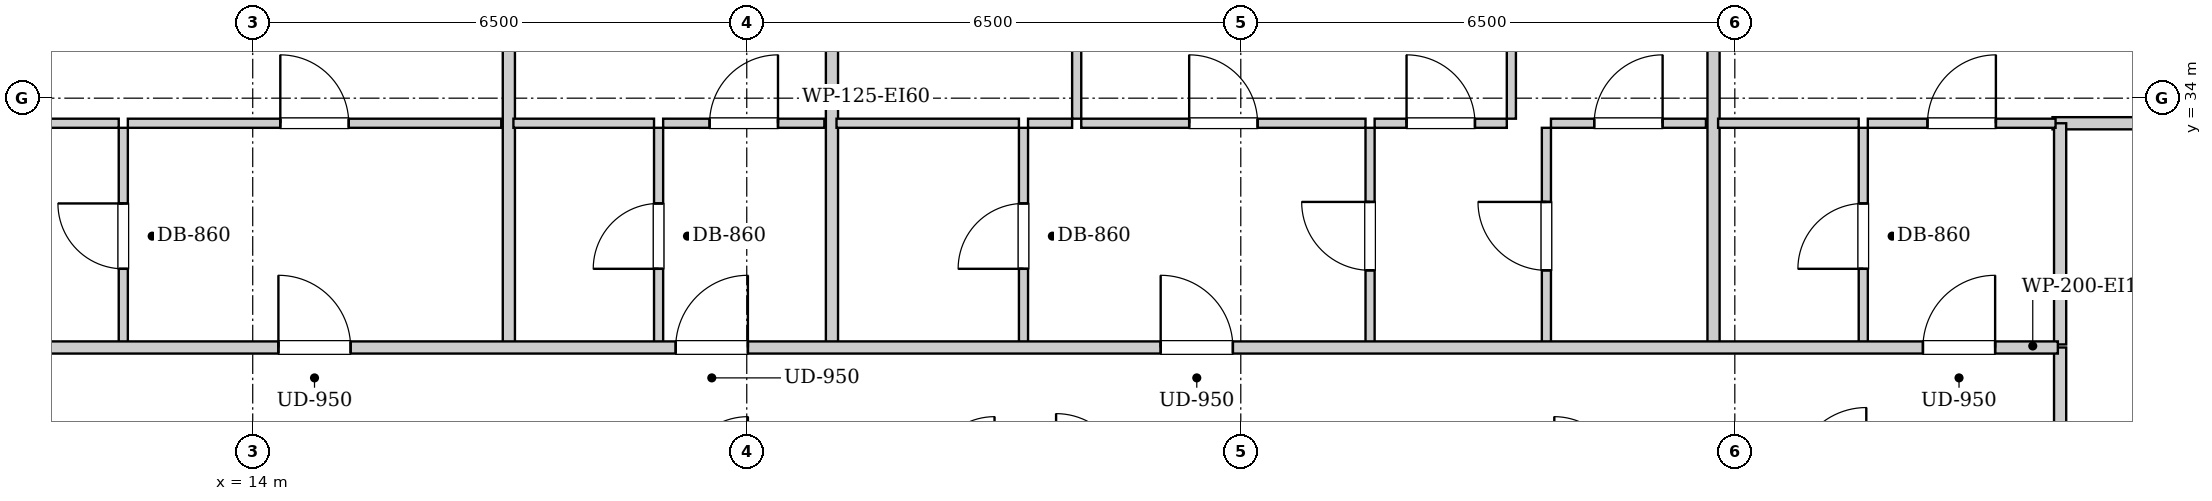
"""IFC4 building model, lengths in metres.
Left out: names, types, materials, properties, quantities, classifications, styles, units other than length and angle.
Written with IfcOpenShell. Run it as: python <this file> out.ifc"""

import sys

from ifc_helpers import new_model, si_unit, direction, frame, frame_2d, origin, place, context, subcontext, project, spatial, rectangle, extrude, element, fill, save


model = new_model("IFC4")
c1 = context("Model", 3, precision=1e-05, world=origin(), true_north=direction((0.0, 1.0)))
c2 = subcontext(c1, "Body", "Model", "MODEL_VIEW")
j1 = project(units=[si_unit("LENGTHUNIT", "METRE"), si_unit("PLANEANGLEUNIT", "RADIAN")], contexts=[c1])
p1 = place(None, origin())
s1 = spatial("IfcSite", under=j1, at=p1, CompositionType="ELEMENT")
p2 = place(p1, origin())
s2 = spatial("IfcBuilding", under=s1, at=p2, CompositionType="ELEMENT")
p3 = place(p2, frame((0.0, 0.0, 166.65)))
s3 = spatial("IfcBuildingStorey", under=s2, at=p3, CompositionType="ELEMENT", Elevation=166.65)
p4 = place(p3, frame((37.78, 28.98, 0.0), z_axis=(0.0, 0.0, 1.0), x_axis=(0.0, 1.0, 0.0)))
e1 = element("IfcWall", 1, at=p4, inside=s3, PredefinedType="PARTITIONING", context=c2, shape_type="SweptSolid", body=[
    extrude(rectangle(XDim=1.74, YDim=0.16, at=frame_2d((0.87, 0.0))), origin(), (0.0, 0.0, 1.0), 2.93),
])
p5 = place(p3, frame((12.297, 30.76, 0.0), z_axis=(0.0, 0.0, 1.0), x_axis=(0.0, 1.0, 0.0)))
e2 = element("IfcWall", 2, at=p5, inside=s3, PredefinedType="PARTITIONING", context=c2, shape_type="SweptSolid", body=[
    extrude(rectangle(XDim=2.85, YDim=0.12, at=frame_2d((1.425, 0.0))), origin(), (0.0, 0.0, 1.0), 2.93),
])
p6 = place(p5, frame((0.995, 0.0, 0.0)))
e3 = element("IfcOpeningElement", 3, at=p6, cuts=e2, PredefinedType="OPENING", context=c2, shape_type="SweptSolid", body=[
    extrude(rectangle(XDim=0.86, YDim=2.05, at=frame_2d((0.43, 1.025))), frame((0.0, 0.07, 0.0), z_axis=(0.0, -1.0, 0.0), x_axis=(1.0, 0.0, 0.0)), (0.0, 0.0, 1.0), 0.14),
])
p7 = place(p3, frame((11.11, 33.67, 0.0), z_axis=(0.0, 0.0, 1.0), x_axis=(1.0, 0.0, 0.0)))
e4 = element("IfcWall", 4, at=p7, inside=s3, PredefinedType="PARTITIONING", context=c2, shape_type="SweptSolid", body=[
    extrude(rectangle(XDim=1.127, YDim=0.12, at=frame_2d((0.563, 0.0))), origin(), (0.0, 0.0, 1.0), 2.93),
])
p8 = place(p3, frame((12.357, 33.67, 0.0), z_axis=(0.0, 0.0, 1.0), x_axis=(1.0, 0.0, 0.0)))
e5 = element("IfcWall", 5, at=p8, inside=s3, PredefinedType="PARTITIONING", context=c2, shape_type="SweptSolid", body=[
    extrude(rectangle(XDim=4.913, YDim=0.12, at=frame_2d((2.457, 0.0))), origin(), (0.0, 0.0, 1.0), 2.93),
])
p9 = place(p8, frame((2.006, 0.0, 0.0)))
e6 = element("IfcOpeningElement", 6, at=p9, cuts=e5, PredefinedType="OPENING", context=c2, shape_type="SweptSolid", body=[
    extrude(rectangle(XDim=0.9, YDim=2.05, at=frame_2d((0.45, 1.025))), frame((0.0, 0.07, 0.0), z_axis=(0.0, -1.0, 0.0), x_axis=(1.0, 0.0, 0.0)), (0.0, 0.0, 1.0), 0.14),
])
p10 = place(p3, frame((17.37, 30.76, 0.0), z_axis=(0.0, 0.0, 1.0), x_axis=(0.0, 1.0, 0.0)))
e7 = element("IfcWall", 7, at=p10, inside=s3, PredefinedType="PARTITIONING", context=c2, shape_type="SweptSolid", body=[
    extrude(rectangle(XDim=12.26, YDim=0.16, at=frame_2d((6.13, 0.0))), origin(), (0.0, 0.0, 1.0), 2.93),
])
p11 = place(p3, frame((19.34, 30.76, 0.0), z_axis=(0.0, 0.0, 1.0), x_axis=(0.0, 1.0, 0.0)))
e8 = element("IfcWall", 8, at=p11, inside=s3, PredefinedType="PARTITIONING", context=c2, shape_type="SweptSolid", body=[
    extrude(rectangle(XDim=2.85, YDim=0.12, at=frame_2d((1.425, 0.0))), origin(), (0.0, 0.0, 1.0), 2.93),
])
p12 = place(p11, frame((0.995, 0.0, 0.0)))
e9 = element("IfcOpeningElement", 9, at=p12, cuts=e8, PredefinedType="OPENING", context=c2, shape_type="SweptSolid", body=[
    extrude(rectangle(XDim=0.86, YDim=2.05, at=frame_2d((0.43, 1.025))), frame((0.0, 0.07, 0.0), z_axis=(0.0, -1.0, 0.0), x_axis=(1.0, 0.0, 0.0)), (0.0, 0.0, 1.0), 0.14),
])
p13 = place(p3, frame((17.43, 33.67, 0.0), z_axis=(0.0, 0.0, 1.0), x_axis=(1.0, 0.0, 0.0)))
e10 = element("IfcWall", 10, at=p13, inside=s3, PredefinedType="PARTITIONING", context=c2, shape_type="SweptSolid", body=[
    extrude(rectangle(XDim=1.85, YDim=0.12, at=frame_2d((0.925, 0.0))), origin(), (0.0, 0.0, 1.0), 2.93),
])
p14 = place(p3, frame((19.4, 33.67, 0.0), z_axis=(0.0, 0.0, 1.0), x_axis=(1.0, 0.0, 0.0)))
e11 = element("IfcWall", 11, at=p14, inside=s3, PredefinedType="PARTITIONING", context=c2, shape_type="SweptSolid", body=[
    extrude(rectangle(XDim=2.121, YDim=0.12, at=frame_2d((1.061, 0.0))), origin(), (0.0, 0.0, 1.0), 2.93),
])
p15 = place(p14, frame((0.611, 0.0, 0.0)))
e12 = element("IfcOpeningElement", 12, at=p15, cuts=e11, PredefinedType="OPENING", context=c2, shape_type="SweptSolid", body=[
    extrude(rectangle(XDim=0.9, YDim=2.05, at=frame_2d((0.45, 1.025))), frame((0.0, 0.07, 0.0), z_axis=(0.0, -1.0, 0.0), x_axis=(1.0, 0.0, 0.0)), (0.0, 0.0, 1.0), 0.14),
])
p16 = place(p3, frame((21.621, 30.76, 0.0), z_axis=(0.0, 0.0, 1.0), x_axis=(0.0, 1.0, 0.0)))
e13 = element("IfcWall", 13, at=p16, inside=s3, PredefinedType="PARTITIONING", context=c2, shape_type="SweptSolid", body=[
    extrude(rectangle(XDim=12.26, YDim=0.16, at=frame_2d((6.13, 0.0))), origin(), (0.0, 0.0, 1.0), 2.93),
])
p17 = place(p3, frame((24.141, 30.76, 0.0), z_axis=(0.0, 0.0, 1.0), x_axis=(0.0, 1.0, 0.0)))
e14 = element("IfcWall", 14, at=p17, inside=s3, PredefinedType="PARTITIONING", context=c2, shape_type="SweptSolid", body=[
    extrude(rectangle(XDim=2.85, YDim=0.12, at=frame_2d((1.425, 0.0))), origin(), (0.0, 0.0, 1.0), 2.93),
])
p18 = place(p17, frame((0.995, 0.0, 0.0)))
e15 = element("IfcOpeningElement", 15, at=p18, cuts=e14, PredefinedType="OPENING", context=c2, shape_type="SweptSolid", body=[
    extrude(rectangle(XDim=0.86, YDim=2.05, at=frame_2d((0.43, 1.025))), frame((0.0, 0.07, 0.0), z_axis=(0.0, -1.0, 0.0), x_axis=(1.0, 0.0, 0.0)), (0.0, 0.0, 1.0), 0.14),
])
p19 = place(p3, frame((21.681, 33.67, 0.0), z_axis=(0.0, 0.0, 1.0), x_axis=(1.0, 0.0, 0.0)))
e16 = element("IfcWall", 16, at=p19, inside=s3, PredefinedType="PARTITIONING", context=c2, shape_type="SweptSolid", body=[
    extrude(rectangle(XDim=2.4, YDim=0.12, at=frame_2d((1.2, 0.0))), origin(), (0.0, 0.0, 1.0), 2.93),
])
p20 = place(p3, frame((28.701, 30.76, 0.0), z_axis=(0.0, 0.0, 1.0), x_axis=(0.0, 1.0, 0.0)))
e17 = element("IfcWall", 17, at=p20, inside=s3, PredefinedType="PARTITIONING", context=c2, shape_type="SweptSolid", body=[
    extrude(rectangle(XDim=2.85, YDim=0.12, at=frame_2d((1.425, 0.0))), origin(), (0.0, 0.0, 1.0), 2.93),
])
p21 = place(p20, frame((0.975, 0.0, 0.0)))
e18 = element("IfcOpeningElement", 18, at=p21, cuts=e17, PredefinedType="OPENING", context=c2, shape_type="SweptSolid", body=[
    extrude(rectangle(XDim=0.9, YDim=2.05, at=frame_2d((0.45, 1.025))), frame((0.0, 0.07, 0.0), z_axis=(0.0, -1.0, 0.0), x_axis=(1.0, 0.0, 0.0)), (0.0, 0.0, 1.0), 0.14),
])
p22 = place(p3, frame((24.201, 33.67, 0.0), z_axis=(0.0, 0.0, 1.0), x_axis=(1.0, 0.0, 0.0)))
e19 = element("IfcWall", 19, at=p22, inside=s3, PredefinedType="PARTITIONING", context=c2, shape_type="SweptSolid", body=[
    extrude(rectangle(XDim=0.58, YDim=0.12, at=frame_2d((0.29, 0.0))), origin(), (0.0, 0.0, 1.0), 2.93),
])
p23 = place(p3, frame((24.901, 33.67, 0.0), z_axis=(0.0, 0.0, 1.0), x_axis=(1.0, 0.0, 0.0)))
e20 = element("IfcWall", 20, at=p23, inside=s3, PredefinedType="PARTITIONING", context=c2, shape_type="SweptSolid", body=[
    extrude(rectangle(XDim=3.74, YDim=0.12, at=frame_2d((1.87, 0.0))), origin(), (0.0, 0.0, 1.0), 2.93),
])
p24 = place(p23, frame((1.42, 0.0, 0.0)))
e21 = element("IfcOpeningElement", 21, at=p24, cuts=e20, PredefinedType="OPENING", context=c2, shape_type="SweptSolid", body=[
    extrude(rectangle(XDim=0.9, YDim=2.05, at=frame_2d((0.45, 1.025))), frame((0.0, 0.07, 0.0), z_axis=(0.0, -1.0, 0.0), x_axis=(1.0, 0.0, 0.0)), (0.0, 0.0, 1.0), 0.14),
])
p25 = place(p3, frame((31.021, 30.76, 0.0), z_axis=(0.0, 0.0, 1.0), x_axis=(0.0, 1.0, 0.0)))
e22 = element("IfcWall", 22, at=p25, inside=s3, PredefinedType="PARTITIONING", context=c2, shape_type="SweptSolid", body=[
    extrude(rectangle(XDim=2.85, YDim=0.12, at=frame_2d((1.425, 0.0))), origin(), (0.0, 0.0, 1.0), 2.93),
])
p26 = place(p25, frame((0.975, 0.0, 0.0)))
e23 = element("IfcOpeningElement", 23, at=p26, cuts=e22, PredefinedType="OPENING", context=c2, shape_type="SweptSolid", body=[
    extrude(rectangle(XDim=0.9, YDim=2.05, at=frame_2d((0.45, 1.025))), frame((0.0, 0.07, 0.0), z_axis=(0.0, -1.0, 0.0), x_axis=(1.0, 0.0, 0.0)), (0.0, 0.0, 1.0), 0.14),
])
p27 = place(p3, frame((28.761, 33.67, 0.0), z_axis=(0.0, 0.0, 1.0), x_axis=(1.0, 0.0, 0.0)))
e24 = element("IfcWall", 24, at=p27, inside=s3, PredefinedType="PARTITIONING", context=c2, shape_type="SweptSolid", body=[
    extrude(rectangle(XDim=1.739, YDim=0.12, at=frame_2d((0.87, 0.0))), origin(), (0.0, 0.0, 1.0), 2.93),
])
p28 = place(p27, frame((0.42, 0.0, 0.0)))
e25 = element("IfcOpeningElement", 25, at=p28, cuts=e24, PredefinedType="OPENING", context=c2, shape_type="SweptSolid", body=[
    extrude(rectangle(XDim=0.9, YDim=2.05, at=frame_2d((0.45, 1.025))), frame((0.0, 0.07, 0.0), z_axis=(0.0, -1.0, 0.0), x_axis=(1.0, 0.0, 0.0)), (0.0, 0.0, 1.0), 0.14),
])
p29 = place(p3, frame((31.081, 33.67, 0.0), z_axis=(0.0, 0.0, 1.0), x_axis=(1.0, 0.0, 0.0)))
e26 = element("IfcWall", 26, at=p29, inside=s3, PredefinedType="PARTITIONING", context=c2, shape_type="SweptSolid", body=[
    extrude(rectangle(XDim=2.039, YDim=0.12, at=frame_2d((1.02, 0.0))), origin(), (0.0, 0.0, 1.0), 2.93),
])
p30 = place(p29, frame((0.569, 0.0, 0.0)))
e27 = element("IfcOpeningElement", 27, at=p30, cuts=e26, PredefinedType="OPENING", context=c2, shape_type="SweptSolid", body=[
    extrude(rectangle(XDim=0.9, YDim=2.05, at=frame_2d((0.45, 1.025))), frame((0.0, 0.07, 0.0), z_axis=(0.0, -1.0, 0.0), x_axis=(1.0, 0.0, 0.0)), (0.0, 0.0, 1.0), 0.14),
])
p31 = place(p3, frame((24.841, 33.73, 0.0), z_axis=(0.0, 0.0, 1.0), x_axis=(0.0, 1.0, 0.0)))
e28 = element("IfcWall", 28, at=p31, inside=s3, PredefinedType="PARTITIONING", context=c2, shape_type="SweptSolid", body=[
    extrude(rectangle(XDim=9.29, YDim=0.12, at=frame_2d((4.645, 0.0))), origin(), (0.0, 0.0, 1.0), 2.93),
])
p32 = place(p31, frame((4.18, 0.0, 0.0)))
e29 = element("IfcOpeningElement", 29, at=p32, cuts=e28, PredefinedType="OPENING", context=c2, shape_type="SweptSolid", body=[
    extrude(rectangle(XDim=0.9, YDim=2.05, at=frame_2d((0.45, 1.025))), frame((0.0, 0.07, 0.0), z_axis=(0.0, -1.0, 0.0), x_axis=(1.0, 0.0, 0.0)), (0.0, 0.0, 1.0), 0.14),
])
p33 = place(p3, frame((30.56, 33.73, 0.0), z_axis=(0.0, 0.0, 1.0), x_axis=(0.0, 1.0, 0.0)))
e30 = element("IfcWall", 30, at=p33, inside=s3, PredefinedType="PARTITIONING", context=c2, shape_type="SweptSolid", body=[
    extrude(rectangle(XDim=7.14, YDim=0.12, at=frame_2d((3.57, 0.0))), origin(), (0.0, 0.0, 1.0), 2.93),
])
p34 = place(p33, frame((3.12, 0.0, 0.0)))
e31 = element("IfcOpeningElement", 31, at=p34, cuts=e30, PredefinedType="OPENING", context=c2, shape_type="SweptSolid", body=[
    extrude(rectangle(XDim=0.9, YDim=2.05, at=frame_2d((0.45, 1.025))), frame((0.0, 0.07, 0.0), z_axis=(0.0, -1.0, 0.0), x_axis=(1.0, 0.0, 0.0)), (0.0, 0.0, 1.0), 0.14),
])
p35 = place(p3, frame((37.68, 33.67, 0.0), z_axis=(0.0, 0.0, 1.0), x_axis=(1.0, 0.0, 0.0)))
e32 = element("IfcWall", 32, at=p35, inside=s3, PredefinedType="PARTITIONING", context=c2, shape_type="SweptSolid", body=[
    extrude(rectangle(XDim=2.34, YDim=0.16, at=frame_2d((1.17, 0.0))), origin(), (0.0, 0.0, 1.0), 2.93),
])
p36 = place(p3, frame((37.78, 30.76, 0.0), z_axis=(0.0, 0.0, 1.0), x_axis=(0.0, 1.0, 0.0)))
e33 = element("IfcWall", 33, at=p36, inside=s3, PredefinedType="PARTITIONING", context=c2, shape_type="SweptSolid", body=[
    extrude(rectangle(XDim=2.91, YDim=0.16, at=frame_2d((1.455, 0.0))), origin(), (0.0, 0.0, 1.0), 2.93),
])
p37 = place(p3, frame((33.22, 30.76, 0.0), z_axis=(0.0, 0.0, 1.0), x_axis=(0.0, 1.0, 0.0)))
e34 = element("IfcWall", 34, at=p37, inside=s3, PredefinedType="PARTITIONING", context=c2, shape_type="SweptSolid", body=[
    extrude(rectangle(XDim=10.28, YDim=0.16, at=frame_2d((5.14, 0.0))), origin(), (0.0, 0.0, 1.0), 2.382),
])
p38 = place(p3, frame((35.19, 30.76, 0.0), z_axis=(0.0, 0.0, 1.0), x_axis=(0.0, 1.0, 0.0)))
e35 = element("IfcWall", 35, at=p38, inside=s3, PredefinedType="PARTITIONING", context=c2, shape_type="SweptSolid", body=[
    extrude(rectangle(XDim=2.85, YDim=0.12, at=frame_2d((1.425, 0.0))), origin(), (0.0, 0.0, 1.0), 2.93),
])
p39 = place(p38, frame((0.995, 0.0, 0.0)))
e36 = element("IfcOpeningElement", 36, at=p39, cuts=e35, PredefinedType="OPENING", context=c2, shape_type="SweptSolid", body=[
    extrude(rectangle(XDim=0.86, YDim=2.05, at=frame_2d((0.43, 1.025))), frame((0.0, 0.07, 0.0), z_axis=(0.0, -1.0, 0.0), x_axis=(1.0, 0.0, 0.0)), (0.0, 0.0, 1.0), 0.14),
])
p40 = place(p3, frame((33.28, 33.67, 0.0), z_axis=(0.0, 0.0, 1.0), x_axis=(1.0, 0.0, 0.0)))
e37 = element("IfcWall", 37, at=p40, inside=s3, PredefinedType="PARTITIONING", context=c2, shape_type="SweptSolid", body=[
    extrude(rectangle(XDim=1.85, YDim=0.12, at=frame_2d((0.925, 0.0))), origin(), (0.0, 0.0, 1.0), 2.93),
])
p41 = place(p3, frame((35.25, 33.67, 0.0), z_axis=(0.0, 0.0, 1.0), x_axis=(1.0, 0.0, 0.0)))
e38 = element("IfcWall", 38, at=p41, inside=s3, PredefinedType="PARTITIONING", context=c2, shape_type="SweptSolid", body=[
    extrude(rectangle(XDim=2.47, YDim=0.12, at=frame_2d((1.235, 0.0))), origin(), (0.0, 0.0, 1.0), 2.93),
])
p42 = place(p41, frame((0.785, 0.0, 0.0)))
e39 = element("IfcOpeningElement", 39, at=p42, cuts=e38, PredefinedType="OPENING", context=c2, shape_type="SweptSolid", body=[
    extrude(rectangle(XDim=0.9, YDim=2.05, at=frame_2d((0.45, 1.025))), frame((0.0, 0.07, 0.0), z_axis=(0.0, -1.0, 0.0), x_axis=(1.0, 0.0, 0.0)), (0.0, 0.0, 1.0), 0.14),
])
p43 = place(p3, frame((10.05, 30.72, 0.0), z_axis=(0.0, 0.0, 1.0), x_axis=(1.0, 0.0, 0.0)))
e40 = element("IfcWall", 40, at=p43, inside=s3, PredefinedType="PARTITIONING", context=c2, shape_type="SweptSolid", body=[
    extrude(rectangle(XDim=27.7, YDim=0.16, at=frame_2d((13.85, 0.0))), origin(), (0.0, 0.0, 1.0), 2.93),
])
p44 = place(p43, frame((4.288, 0.0, 0.0)))
e41 = element("IfcOpeningElement", 41, at=p44, cuts=e40, PredefinedType="OPENING", context=c2, shape_type="SweptSolid", body=[
    extrude(rectangle(XDim=0.95, YDim=2.1, at=frame_2d((0.475, 1.05))), frame((0.0, 0.09, 0.0), z_axis=(0.0, -1.0, 0.0), x_axis=(1.0, 0.0, 0.0)), (0.0, 0.0, 1.0), 0.18),
])
p45 = place(p43, frame((9.515, 0.0, 0.0)))
e42 = element("IfcOpeningElement", 42, at=p45, cuts=e40, PredefinedType="OPENING", context=c2, shape_type="SweptSolid", body=[
    extrude(rectangle(XDim=0.95, YDim=2.1, at=frame_2d((0.475, 1.05))), frame((0.0, 0.09, 0.0), z_axis=(0.0, -1.0, 0.0), x_axis=(1.0, 0.0, 0.0)), (0.0, 0.0, 1.0), 0.18),
])
p46 = place(p43, frame((15.896, 0.0, 0.0)))
e43 = element("IfcOpeningElement", 43, at=p46, cuts=e40, PredefinedType="OPENING", context=c2, shape_type="SweptSolid", body=[
    extrude(rectangle(XDim=0.95, YDim=2.1, at=frame_2d((0.475, 1.05))), frame((0.0, 0.09, 0.0), z_axis=(0.0, -1.0, 0.0), x_axis=(1.0, 0.0, 0.0)), (0.0, 0.0, 1.0), 0.18),
])
p47 = place(p43, frame((25.925, 0.0, 0.0)))
e44 = element("IfcOpeningElement", 44, at=p47, cuts=e40, PredefinedType="OPENING", context=c2, shape_type="SweptSolid", body=[
    extrude(rectangle(XDim=0.95, YDim=2.1, at=frame_2d((0.475, 1.05))), frame((0.0, 0.09, 0.0), z_axis=(0.0, -1.0, 0.0), x_axis=(1.0, 0.0, 0.0)), (0.0, 0.0, 1.0), 0.18),
])
p48 = place(p6, origin())
e45 = element("IfcDoor", 45, at=p48, inside=s3, OperationType="SINGLE_SWING_RIGHT", PredefinedType="DOOR", context=c2, shape_type="SweptSolid", body=[
    extrude(rectangle(XDim=0.86, YDim=2.05, at=frame_2d((0.43, 1.025))), frame((0.0, 0.025, 0.0), z_axis=(0.0, -1.0, 0.0), x_axis=(1.0, 0.0, 0.0)), (0.0, 0.0, 1.0), 0.05),
])
fill(e3, e45)
p49 = place(p9, origin())
e46 = element("IfcDoor", 46, at=p49, inside=s3, OperationType="SINGLE_SWING_LEFT", PredefinedType="DOOR", context=c2, shape_type="SweptSolid", body=[
    extrude(rectangle(XDim=0.9, YDim=2.05, at=frame_2d((0.45, 1.025))), frame((0.0, 0.025, 0.0), z_axis=(0.0, -1.0, 0.0), x_axis=(1.0, 0.0, 0.0)), (0.0, 0.0, 1.0), 0.05),
])
fill(e6, e46)
p50 = place(p12, origin())
e47 = element("IfcDoor", 47, at=p50, inside=s3, OperationType="SINGLE_SWING_LEFT", PredefinedType="DOOR", context=c2, shape_type="SweptSolid", body=[
    extrude(rectangle(XDim=0.86, YDim=2.05, at=frame_2d((0.43, 1.025))), frame((0.0, 0.025, 0.0), z_axis=(0.0, -1.0, 0.0), x_axis=(1.0, 0.0, 0.0)), (0.0, 0.0, 1.0), 0.05),
])
fill(e9, e47)
p51 = place(p15, origin())
e48 = element("IfcDoor", 48, at=p51, inside=s3, OperationType="SINGLE_SWING_RIGHT", PredefinedType="DOOR", context=c2, shape_type="SweptSolid", body=[
    extrude(rectangle(XDim=0.9, YDim=2.05, at=frame_2d((0.45, 1.025))), frame((0.0, 0.025, 0.0), z_axis=(0.0, -1.0, 0.0), x_axis=(1.0, 0.0, 0.0)), (0.0, 0.0, 1.0), 0.05),
])
fill(e12, e48)
p52 = place(p18, origin())
e49 = element("IfcDoor", 49, at=p52, inside=s3, OperationType="SINGLE_SWING_LEFT", PredefinedType="DOOR", context=c2, shape_type="SweptSolid", body=[
    extrude(rectangle(XDim=0.86, YDim=2.05, at=frame_2d((0.43, 1.025))), frame((0.0, 0.025, 0.0), z_axis=(0.0, -1.0, 0.0), x_axis=(1.0, 0.0, 0.0)), (0.0, 0.0, 1.0), 0.05),
])
fill(e15, e49)
p53 = place(p21, origin())
e50 = element("IfcDoor", 50, at=p53, inside=s3, OperationType="SINGLE_SWING_RIGHT", PredefinedType="DOOR", context=c2, shape_type="SweptSolid", body=[
    extrude(rectangle(XDim=0.9, YDim=2.05, at=frame_2d((0.45, 1.025))), frame((0.0, 0.025, 0.0), z_axis=(0.0, -1.0, 0.0), x_axis=(1.0, 0.0, 0.0)), (0.0, 0.0, 1.0), 0.05),
])
fill(e18, e50)
p54 = place(p24, origin())
e51 = element("IfcDoor", 51, at=p54, inside=s3, OperationType="SINGLE_SWING_LEFT", PredefinedType="DOOR", context=c2, shape_type="SweptSolid", body=[
    extrude(rectangle(XDim=0.9, YDim=2.05, at=frame_2d((0.45, 1.025))), frame((0.0, 0.025, 0.0), z_axis=(0.0, -1.0, 0.0), x_axis=(1.0, 0.0, 0.0)), (0.0, 0.0, 1.0), 0.05),
])
fill(e21, e51)
p55 = place(p26, origin())
e52 = element("IfcDoor", 52, at=p55, inside=s3, OperationType="SINGLE_SWING_RIGHT", PredefinedType="DOOR", context=c2, shape_type="SweptSolid", body=[
    extrude(rectangle(XDim=0.9, YDim=2.05, at=frame_2d((0.45, 1.025))), frame((0.0, 0.025, 0.0), z_axis=(0.0, -1.0, 0.0), x_axis=(1.0, 0.0, 0.0)), (0.0, 0.0, 1.0), 0.05),
])
fill(e23, e52)
p56 = place(p28, origin())
e53 = element("IfcDoor", 53, at=p56, inside=s3, OperationType="SINGLE_SWING_LEFT", PredefinedType="DOOR", context=c2, shape_type="SweptSolid", body=[
    extrude(rectangle(XDim=0.9, YDim=2.05, at=frame_2d((0.45, 1.025))), frame((0.0, 0.025, 0.0), z_axis=(0.0, -1.0, 0.0), x_axis=(1.0, 0.0, 0.0)), (0.0, 0.0, 1.0), 0.05),
])
fill(e25, e53)
p57 = place(p30, origin())
e54 = element("IfcDoor", 54, at=p57, inside=s3, OperationType="SINGLE_SWING_RIGHT", PredefinedType="DOOR", context=c2, shape_type="SweptSolid", body=[
    extrude(rectangle(XDim=0.9, YDim=2.05, at=frame_2d((0.45, 1.025))), frame((0.0, 0.025, 0.0), z_axis=(0.0, -1.0, 0.0), x_axis=(1.0, 0.0, 0.0)), (0.0, 0.0, 1.0), 0.05),
])
fill(e27, e54)
p58 = place(p39, origin())
e55 = element("IfcDoor", 55, at=p58, inside=s3, OperationType="SINGLE_SWING_LEFT", PredefinedType="DOOR", context=c2, shape_type="SweptSolid", body=[
    extrude(rectangle(XDim=0.86, YDim=2.05, at=frame_2d((0.43, 1.025))), frame((0.0, 0.025, 0.0), z_axis=(0.0, -1.0, 0.0), x_axis=(1.0, 0.0, 0.0)), (0.0, 0.0, 1.0), 0.05),
])
fill(e36, e55)
p59 = place(p42, origin())
e56 = element("IfcDoor", 56, at=p59, inside=s3, OperationType="SINGLE_SWING_RIGHT", PredefinedType="DOOR", context=c2, shape_type="SweptSolid", body=[
    extrude(rectangle(XDim=0.9, YDim=2.05, at=frame_2d((0.45, 1.025))), frame((0.0, 0.025, 0.0), z_axis=(0.0, -1.0, 0.0), x_axis=(1.0, 0.0, 0.0)), (0.0, 0.0, 1.0), 0.05),
])
fill(e39, e56)
p60 = place(p44, origin())
e57 = element("IfcDoor", 57, at=p60, inside=s3, OperationType="SINGLE_SWING_LEFT", PredefinedType="DOOR", context=c2, shape_type="SweptSolid", body=[
    extrude(rectangle(XDim=0.95, YDim=2.1, at=frame_2d((0.475, 1.05))), frame((0.0, 0.025, 0.0), z_axis=(0.0, -1.0, 0.0), x_axis=(1.0, 0.0, 0.0)), (0.0, 0.0, 1.0), 0.05),
])
fill(e41, e57)
p61 = place(p45, origin())
e58 = element("IfcDoor", 58, at=p61, inside=s3, OperationType="SINGLE_SWING_RIGHT", PredefinedType="DOOR", context=c2, shape_type="SweptSolid", body=[
    extrude(rectangle(XDim=0.95, YDim=2.1, at=frame_2d((0.475, 1.05))), frame((0.0, 0.025, 0.0), z_axis=(0.0, -1.0, 0.0), x_axis=(1.0, 0.0, 0.0)), (0.0, 0.0, 1.0), 0.05),
])
fill(e42, e58)
p62 = place(p46, origin())
e59 = element("IfcDoor", 59, at=p62, inside=s3, OperationType="SINGLE_SWING_LEFT", PredefinedType="DOOR", context=c2, shape_type="SweptSolid", body=[
    extrude(rectangle(XDim=0.95, YDim=2.1, at=frame_2d((0.475, 1.05))), frame((0.0, 0.025, 0.0), z_axis=(0.0, -1.0, 0.0), x_axis=(1.0, 0.0, 0.0)), (0.0, 0.0, 1.0), 0.05),
])
fill(e43, e59)
p63 = place(p47, origin())
e60 = element("IfcDoor", 60, at=p63, inside=s3, OperationType="SINGLE_SWING_RIGHT", PredefinedType="DOOR", context=c2, shape_type="SweptSolid", body=[
    extrude(rectangle(XDim=0.95, YDim=2.1, at=frame_2d((0.475, 1.05))), frame((0.0, 0.025, 0.0), z_axis=(0.0, -1.0, 0.0), x_axis=(1.0, 0.0, 0.0)), (0.0, 0.0, 1.0), 0.05),
])
fill(e44, e60)
save(model, sys.argv[1])
